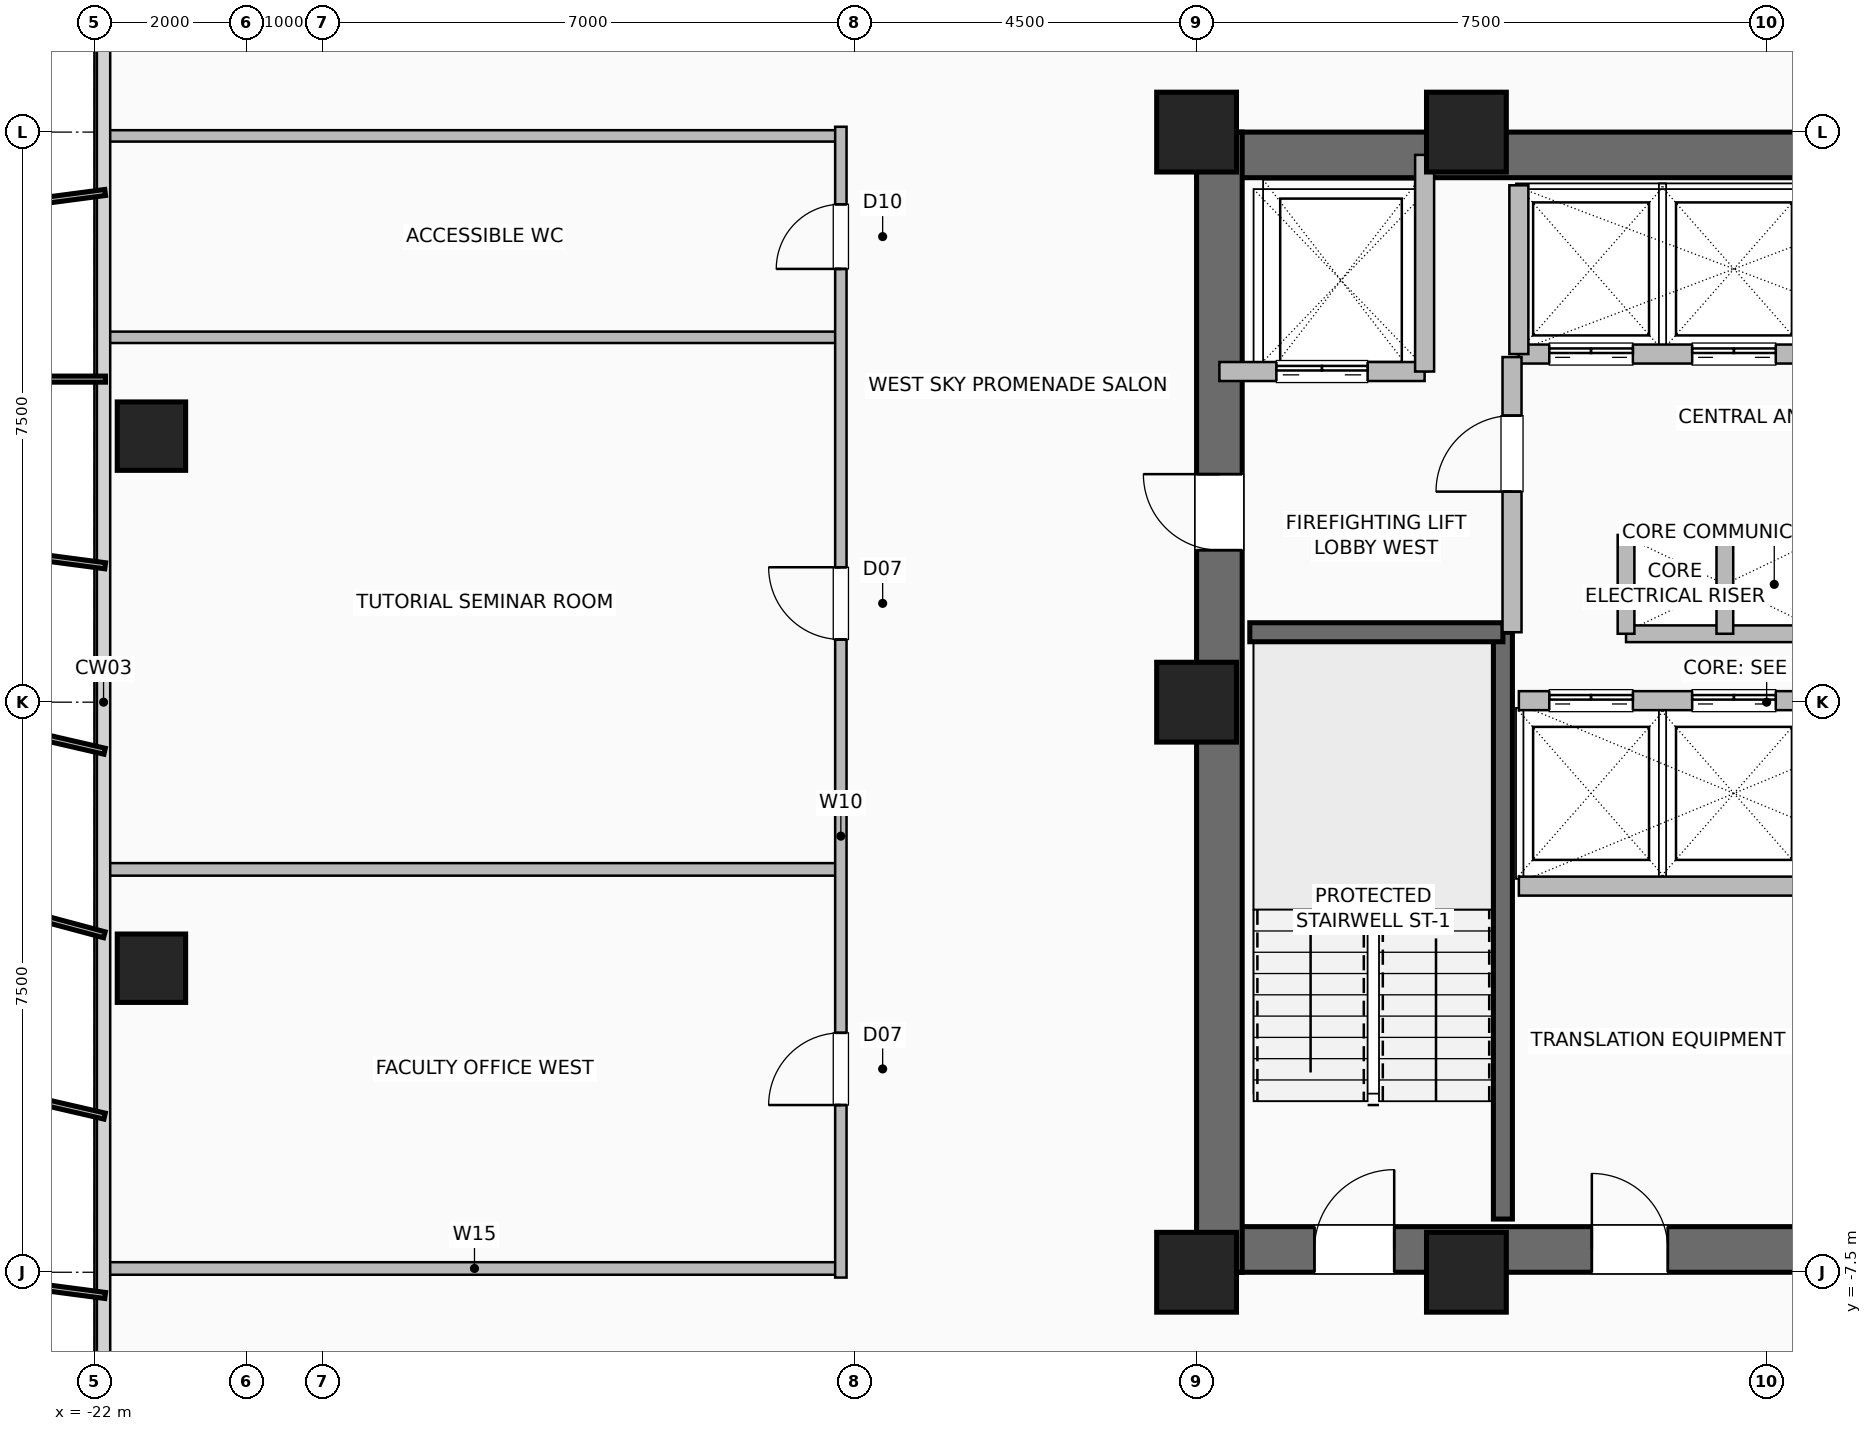
"""IFC4 building model, lengths in metres.
Left out: names, types, materials, properties, quantities, classifications, styles, units other than length and angle.
Written with IfcOpenShell. Run it as: python <this file> out.ifc"""

import sys

from ifc_helpers import new_model, si_unit, direction, frame, frame_2d, origin, origin_2d, place, context, subcontext, project, spatial, rectangle, hollow_rectangle, extrude, element, fill, save


model = new_model("IFC4")
c1 = context("Model", 3, precision=1e-05, world=origin(), true_north=direction((0.0, 1.0)))
c2 = subcontext(c1, "Body", "Model", "MODEL_VIEW")
j1 = project(units=[si_unit("LENGTHUNIT", "METRE"), si_unit("PLANEANGLEUNIT", "RADIAN")], contexts=[c1])
p1 = place(None, origin())
s1 = spatial("IfcSite", under=j1, at=p1, CompositionType="ELEMENT")
p2 = place(p1, origin())
s2 = spatial("IfcBuilding", under=s1, at=p2, CompositionType="ELEMENT")
p3 = place(p2, frame((0.0, 0.0, 137.2)))
s3 = spatial("IfcBuildingStorey", under=s2, at=p3, CompositionType="ELEMENT", Elevation=137.2)
for number, where, z_axis, x_axis in (
    (1, (-7.5, -7.5, 0.0), (0.0, 0.0, 1.0), (1.0, 0.0, 0.0)),
    (2, (-3.95, -7.5, 0.0), (0.0, 0.0, 1.0), (1.0, 0.0, 0.0)),
    (3, (-3.95, 7.5, 0.0), (0.0, 0.0, 1.0), (1.0, 0.0, 0.0)),
    (4, (-7.5, 7.5, 0.0), (0.0, 0.0, 1.0), (1.0, 0.0, 0.0)),
    (5, (-7.5, 0.0, 0.0), (0.0, 0.0, 1.0), (1.0, 0.0, 0.0)),
):
    element("IfcColumn", number, at=place(p3, frame(where, z_axis=z_axis, x_axis=x_axis)), inside=s3, PredefinedType="COLUMN", context=c2, shape_type="SweptSolid", body=[
        extrude(hollow_rectangle(XDim=1.05, YDim=1.05, WallThickness=0.05, at=origin_2d()), origin(), (0.0, 0.0, 1.0), 3.6),
    ])
for number, where, z_axis, x_axis in (
    (6, (-21.25, -3.5, 0.0), (0.0, 0.0, 1.0), (1.0, 0.0, 0.0)),
    (7, (-21.25, 3.5, 0.0), (0.0, 0.0, 1.0), (1.0, 0.0, 0.0)),
):
    element("IfcColumn", number, at=place(p3, frame(where, z_axis=z_axis, x_axis=x_axis)), inside=s3, PredefinedType="COLUMN", context=c2, shape_type="SweptSolid", body=[
        extrude(hollow_rectangle(XDim=0.9, YDim=0.9, WallThickness=0.045, at=origin_2d()), origin(), (0.0, 0.0, 1.0), 3.6),
    ])
p4 = place(p3, frame((-7.5, -7.2, 0.0), z_axis=(0.0, 0.0, 1.0), x_axis=(1.0, 0.0, 0.0)))
e8 = element("IfcWall", 8, at=p4, inside=s3, PredefinedType="SHEAR", context=c2, shape_type="SweptSolid", body=[
    extrude(rectangle(XDim=15.0, YDim=0.6, at=frame_2d((7.5, 0.0))), origin(), (0.0, 0.0, 1.0), 3.36),
])
p5 = place(p4, frame((1.55, 0.0, 0.0)))
e9 = element("IfcOpeningElement", 9, at=p5, cuts=e8, PredefinedType="OPENING", context=c2, shape_type="SweptSolid", body=[
    extrude(rectangle(XDim=1.05, YDim=2.08, at=frame_2d((0.525, 1.04))), frame((0.0, 0.31, 0.0), z_axis=(0.0, -1.0, 0.0), x_axis=(1.0, 0.0, 0.0)), (0.0, 0.0, 1.0), 0.62),
])
p6 = place(p4, frame((12.4, 0.0, 0.0)))
e10 = element("IfcOpeningElement", 10, at=p6, cuts=e8, PredefinedType="OPENING", context=c2, shape_type="SweptSolid", body=[
    extrude(rectangle(XDim=1.05, YDim=2.08, at=frame_2d((0.525, 1.04))), frame((0.0, 0.31, 0.0), z_axis=(0.0, -1.0, 0.0), x_axis=(1.0, 0.0, 0.0)), (0.0, 0.0, 1.0), 0.62),
])
p7 = place(p4, frame((5.2, 0.0, 0.0)))
e11 = element("IfcOpeningElement", 11, at=p7, cuts=e8, PredefinedType="OPENING", context=c2, shape_type="SweptSolid", body=[
    extrude(rectangle(XDim=1.0, YDim=2.08, at=frame_2d((0.5, 1.04))), frame((0.0, 0.31, 0.0), z_axis=(0.0, -1.0, 0.0), x_axis=(1.0, 0.0, 0.0)), (0.0, 0.0, 1.0), 0.62),
])
p8 = place(p4, frame((8.65, 0.0, 0.0)))
e12 = element("IfcOpeningElement", 12, at=p8, cuts=e8, PredefinedType="OPENING", context=c2, shape_type="SweptSolid", body=[
    extrude(rectangle(XDim=1.0, YDim=2.08, at=frame_2d((0.5, 1.04))), frame((0.0, 0.31, 0.0), z_axis=(0.0, -1.0, 0.0), x_axis=(1.0, 0.0, 0.0)), (0.0, 0.0, 1.0), 0.62),
])
p9 = place(p3, frame((-7.5, 7.2, 0.0), z_axis=(0.0, 0.0, 1.0), x_axis=(1.0, 0.0, 0.0)))
e13 = element("IfcWall", 13, at=p9, inside=s3, PredefinedType="SHEAR", context=c2, shape_type="SweptSolid", body=[
    extrude(rectangle(XDim=15.0, YDim=0.6, at=frame_2d((7.5, 0.0))), origin(), (0.0, 0.0, 1.0), 3.36),
])
p10 = place(p3, frame((-7.2, -7.5, 0.0), z_axis=(0.0, 0.0, 1.0), x_axis=(0.0, 1.0, 0.0)))
e14 = element("IfcWall", 14, at=p10, inside=s3, PredefinedType="SHEAR", context=c2, shape_type="SweptSolid", body=[
    extrude(rectangle(XDim=15.0, YDim=0.6, at=frame_2d((7.5, 0.0))), origin(), (0.0, 0.0, 1.0), 3.36),
])
p11 = place(p10, frame((9.5, 0.0, 0.0)))
e15 = element("IfcOpeningElement", 15, at=p11, cuts=e14, PredefinedType="OPENING", context=c2, shape_type="SweptSolid", body=[
    extrude(rectangle(XDim=1.0, YDim=2.08, at=frame_2d((0.5, 1.04))), frame((0.0, 0.31, 0.0), z_axis=(0.0, -1.0, 0.0), x_axis=(1.0, 0.0, 0.0)), (0.0, 0.0, 1.0), 0.62),
])
p12 = place(p3, frame((-3.47, -6.8, 0.0), z_axis=(0.0, 0.0, 1.0), x_axis=(0.0, 1.0, 0.0)))
e16 = element("IfcWall", 16, at=p12, inside=s3, PredefinedType="SHEAR", context=c2, shape_type="SweptSolid", body=[
    extrude(rectangle(XDim=7.72, YDim=0.25, at=frame_2d((3.86, 0.0))), origin(), (0.0, 0.0, 1.0), 3.36),
])
p13 = place(p3, frame((-6.8, 0.92, 0.0), z_axis=(0.0, 0.0, 1.0), x_axis=(1.0, 0.0, 0.0)))
e17 = element("IfcWall", 17, at=p13, inside=s3, PredefinedType="SHEAR", context=c2, shape_type="SweptSolid", body=[
    extrude(rectangle(XDim=3.33, YDim=0.25, at=frame_2d((1.665, 0.0))), origin(), (0.0, 0.0, 1.0), 3.36),
])
for number, where, z_axis, x_axis in (
    (18, (-1.85, 2.2, 0.0), (0.0, 0.0, 1.0), (1.0, 0.0, 0.0)),
    (19, (-1.85, 0.9, 0.0), (0.0, 0.0, 1.0), (1.0, 0.0, 0.0)),
):
    element("IfcWall", number, at=place(p3, frame(where, z_axis=z_axis, x_axis=x_axis)), inside=s3, PredefinedType="PARTITIONING", context=c2, shape_type="SweptSolid", body=[
        extrude(rectangle(XDim=2.6, YDim=0.22, at=frame_2d((1.3, 0.0))), origin(), (0.0, 0.0, 1.0), 3.36),
    ])
for number, where, z_axis, x_axis in (
    (20, (-0.55, 0.9, 0.0), (0.0, 0.0, 1.0), (0.0, 1.0, 0.0)),
    (21, (-1.85, 0.9, 0.0), (0.0, 0.0, 1.0), (0.0, 1.0, 0.0)),
):
    element("IfcWall", number, at=place(p3, frame(where, z_axis=z_axis, x_axis=x_axis)), inside=s3, PredefinedType="PARTITIONING", context=c2, shape_type="SweptSolid", body=[
        extrude(rectangle(XDim=1.3, YDim=0.22, at=frame_2d((0.65, 0.0))), origin(), (0.0, 0.0, 1.0), 3.36),
    ])
p14 = place(p3, frame((-3.26, 0.02, 0.0), z_axis=(0.0, 0.0, 1.0), x_axis=(1.0, 0.0, 0.0)))
e22 = element("IfcWall", 22, at=p14, inside=s3, PredefinedType="SHEAR", context=c2, shape_type="SweptSolid", body=[
    extrude(rectangle(XDim=5.64, YDim=0.25, at=frame_2d((2.82, 0.0))), origin(), (0.0, 0.0, 1.0), 3.36),
])
p15 = place(p14, frame((0.4, 0.0, 0.0)))
e23 = element("IfcOpeningElement", 23, at=p15, cuts=e22, PredefinedType="OPENING", context=c2, shape_type="SweptSolid", body=[
    extrude(rectangle(XDim=1.1, YDim=2.2, at=frame_2d((0.55, 1.1))), frame((0.0, 0.135, 0.0), z_axis=(0.0, -1.0, 0.0), x_axis=(1.0, 0.0, 0.0)), (0.0, 0.0, 1.0), 0.27),
])
p16 = place(p14, frame((2.28, 0.0, 0.0)))
e24 = element("IfcOpeningElement", 24, at=p16, cuts=e22, PredefinedType="OPENING", context=c2, shape_type="SweptSolid", body=[
    extrude(rectangle(XDim=1.1, YDim=2.2, at=frame_2d((0.55, 1.1))), frame((0.0, 0.135, 0.0), z_axis=(0.0, -1.0, 0.0), x_axis=(1.0, 0.0, 0.0)), (0.0, 0.0, 1.0), 0.27),
])
p17 = place(p14, frame((4.16, 0.0, 0.0)))
e25 = element("IfcOpeningElement", 25, at=p17, cuts=e22, PredefinedType="OPENING", context=c2, shape_type="SweptSolid", body=[
    extrude(rectangle(XDim=1.1, YDim=2.2, at=frame_2d((0.55, 1.1))), frame((0.0, 0.135, 0.0), z_axis=(0.0, -1.0, 0.0), x_axis=(1.0, 0.0, 0.0)), (0.0, 0.0, 1.0), 0.27),
])
p18 = place(p3, frame((-3.26, -2.42, 0.0), z_axis=(0.0, 0.0, 1.0), x_axis=(1.0, 0.0, 0.0)))
e26 = element("IfcWall", 26, at=p18, inside=s3, PredefinedType="SHEAR", context=c2, shape_type="SweptSolid", body=[
    extrude(rectangle(XDim=5.64, YDim=0.25, at=frame_2d((2.82, 0.0))), origin(), (0.0, 0.0, 1.0), 3.36),
])
p19 = place(p3, frame((-3.26, 4.58, 0.0), z_axis=(0.0, 0.0, 1.0), x_axis=(1.0, 0.0, 0.0)))
e27 = element("IfcWall", 27, at=p19, inside=s3, PredefinedType="SHEAR", context=c2, shape_type="SweptSolid", body=[
    extrude(rectangle(XDim=5.64, YDim=0.25, at=frame_2d((2.82, 0.0))), origin(), (0.0, 0.0, 1.0), 3.36),
])
p20 = place(p19, frame((0.4, 0.0, 0.0)))
e28 = element("IfcOpeningElement", 28, at=p20, cuts=e27, PredefinedType="OPENING", context=c2, shape_type="SweptSolid", body=[
    extrude(rectangle(XDim=1.1, YDim=2.2, at=frame_2d((0.55, 1.1))), frame((0.0, 0.135, 0.0), z_axis=(0.0, -1.0, 0.0), x_axis=(1.0, 0.0, 0.0)), (0.0, 0.0, 1.0), 0.27),
])
p21 = place(p19, frame((2.28, 0.0, 0.0)))
e29 = element("IfcOpeningElement", 29, at=p21, cuts=e27, PredefinedType="OPENING", context=c2, shape_type="SweptSolid", body=[
    extrude(rectangle(XDim=1.1, YDim=2.2, at=frame_2d((0.55, 1.1))), frame((0.0, 0.135, 0.0), z_axis=(0.0, -1.0, 0.0), x_axis=(1.0, 0.0, 0.0)), (0.0, 0.0, 1.0), 0.27),
])
p22 = place(p19, frame((4.16, 0.0, 0.0)))
e30 = element("IfcOpeningElement", 30, at=p22, cuts=e27, PredefinedType="OPENING", context=c2, shape_type="SweptSolid", body=[
    extrude(rectangle(XDim=1.1, YDim=2.2, at=frame_2d((0.55, 1.1))), frame((0.0, 0.135, 0.0), z_axis=(0.0, -1.0, 0.0), x_axis=(1.0, 0.0, 0.0)), (0.0, 0.0, 1.0), 0.27),
])
p23 = place(p3, frame((-3.26, 4.58, 0.0), z_axis=(0.0, 0.0, 1.0), x_axis=(0.0, 1.0, 0.0)))
e31 = element("IfcWall", 31, at=p23, inside=s3, PredefinedType="SHEAR", context=c2, shape_type="SweptSolid", body=[
    extrude(rectangle(XDim=2.22, YDim=0.25, at=frame_2d((1.11, 0.0))), origin(), (0.0, 0.0, 1.0), 3.36),
])
p24 = place(p3, frame((-7.2, 4.35, 0.0), z_axis=(0.0, 0.0, 1.0), x_axis=(1.0, 0.0, 0.0)))
e32 = element("IfcWall", 32, at=p24, inside=s3, PredefinedType="SHEAR", context=c2, shape_type="SweptSolid", body=[
    extrude(rectangle(XDim=2.7, YDim=0.25, at=frame_2d((1.35, 0.0))), origin(), (0.0, 0.0, 1.0), 3.36),
])
p25 = place(p24, frame((0.75, 0.0, 0.0)))
e33 = element("IfcOpeningElement", 33, at=p25, cuts=e32, PredefinedType="OPENING", context=c2, shape_type="SweptSolid", body=[
    extrude(rectangle(XDim=1.2, YDim=2.2, at=frame_2d((0.6, 1.1))), frame((0.0, 0.135, 0.0), z_axis=(0.0, -1.0, 0.0), x_axis=(1.0, 0.0, 0.0)), (0.0, 0.0, 1.0), 0.27),
])
p26 = place(p3, frame((-4.5, 4.35, 0.0), z_axis=(0.0, 0.0, 1.0), x_axis=(0.0, 1.0, 0.0)))
e34 = element("IfcWall", 34, at=p26, inside=s3, PredefinedType="SHEAR", context=c2, shape_type="SweptSolid", body=[
    extrude(rectangle(XDim=2.85, YDim=0.25, at=frame_2d((1.425, 0.0))), origin(), (0.0, 0.0, 1.0), 3.36),
])
p27 = place(p3, frame((-3.35, 0.92, 0.0), z_axis=(0.0, 0.0, 1.0), x_axis=(0.0, 1.0, 0.0)))
e35 = element("IfcWall", 35, at=p27, inside=s3, PredefinedType="SHEAR", context=c2, shape_type="SweptSolid", body=[
    extrude(rectangle(XDim=3.62, YDim=0.25, at=frame_2d((1.81, 0.0))), origin(), (0.0, 0.0, 1.0), 3.36),
])
p28 = place(p27, frame((1.85, 0.0, 0.0)))
e36 = element("IfcOpeningElement", 36, at=p28, cuts=e35, PredefinedType="OPENING", context=c2, shape_type="SweptSolid", body=[
    extrude(rectangle(XDim=1.0, YDim=2.08, at=frame_2d((0.5, 1.04))), frame((0.0, 0.135, 0.0), z_axis=(0.0, -1.0, 0.0), x_axis=(1.0, 0.0, 0.0)), (0.0, 0.0, 1.0), 0.27),
])
for number, where, z_axis, x_axis in (
    (37, (-21.82, -7.45, 0.0), (0.0, 0.0, 1.0), (1.0, 0.0, 0.0)),
    (38, (-21.82, -2.2, 0.0), (0.0, 0.0, 1.0), (1.0, 0.0, 0.0)),
):
    element("IfcWall", number, at=place(p3, frame(where, z_axis=z_axis, x_axis=x_axis)), inside=s3, PredefinedType="PLUMBINGWALL", context=c2, shape_type="SweptSolid", body=[
        extrude(rectangle(XDim=9.64, YDim=0.165, at=frame_2d((4.82, 0.0))), origin(), (0.0, 0.0, 1.0), 3.36),
    ])
p29 = place(p3, frame((-21.82, 4.8, 0.0), z_axis=(0.0, 0.0, 1.0), x_axis=(1.0, 0.0, 0.0)))
e39 = element("IfcWall", 39, at=p29, inside=s3, PredefinedType="PARTITIONING", context=c2, shape_type="SweptSolid", body=[
    extrude(rectangle(XDim=9.64, YDim=0.15, at=frame_2d((4.82, 0.0))), origin(), (0.0, 0.0, 1.0), 2.928),
])
p30 = place(p3, frame((-21.82, 7.45, 0.0), z_axis=(0.0, 0.0, 1.0), x_axis=(1.0, 0.0, 0.0)))
e40 = element("IfcWall", 40, at=p30, inside=s3, PredefinedType="PARTITIONING", context=c2, shape_type="SweptSolid", body=[
    extrude(rectangle(XDim=9.64, YDim=0.15, at=frame_2d((4.82, 0.0))), origin(), (0.0, 0.0, 1.0), 3.36),
])
p31 = place(p3, frame((-12.18, -7.57, 0.0), z_axis=(0.0, 0.0, 1.0), x_axis=(0.0, 1.0, 0.0)))
e41 = element("IfcWall", 41, at=p31, inside=s3, PredefinedType="PARTITIONING", context=c2, shape_type="SweptSolid", body=[
    extrude(rectangle(XDim=15.14, YDim=0.15, at=frame_2d((7.57, 0.0))), origin(), (0.0, 0.0, 1.0), 3.36),
])
p32 = place(p31, frame((2.27, 0.0, 0.0)))
e42 = element("IfcOpeningElement", 42, at=p32, cuts=e41, PredefinedType="OPENING", context=c2, shape_type="SweptSolid", body=[
    extrude(rectangle(XDim=0.95, YDim=2.06, at=frame_2d((0.475, 1.03))), frame((0.0, 0.085, 0.0), z_axis=(0.0, -1.0, 0.0), x_axis=(1.0, 0.0, 0.0)), (0.0, 0.0, 1.0), 0.17),
])
p33 = place(p31, frame((8.395, 0.0, 0.0)))
e43 = element("IfcOpeningElement", 43, at=p33, cuts=e41, PredefinedType="OPENING", context=c2, shape_type="SweptSolid", body=[
    extrude(rectangle(XDim=0.95, YDim=2.06, at=frame_2d((0.475, 1.03))), frame((0.0, 0.085, 0.0), z_axis=(0.0, -1.0, 0.0), x_axis=(1.0, 0.0, 0.0)), (0.0, 0.0, 1.0), 0.17),
])
p34 = place(p31, frame((13.27, 0.0, 0.0)))
e44 = element("IfcOpeningElement", 44, at=p34, cuts=e41, PredefinedType="OPENING", context=c2, shape_type="SweptSolid", body=[
    extrude(rectangle(XDim=0.85, YDim=2.05, at=frame_2d((0.425, 1.025))), frame((0.0, 0.085, 0.0), z_axis=(0.0, -1.0, 0.0), x_axis=(1.0, 0.0, 0.0)), (0.0, 0.0, 1.0), 0.17),
])
p35 = place(p5, origin())
e45 = element("IfcDoor", 45, at=p35, inside=s3, OperationType="SINGLE_SWING_RIGHT", PredefinedType="DOOR", context=c2, shape_type="SweptSolid", body=[
    extrude(rectangle(XDim=1.05, YDim=2.08, at=frame_2d((0.525, 1.04))), frame((0.0, 0.025, 0.0), z_axis=(0.0, -1.0, 0.0), x_axis=(1.0, 0.0, 0.0)), (0.0, 0.0, 1.0), 0.05),
])
fill(e9, e45)
p36 = place(p11, origin())
e46 = element("IfcDoor", 46, at=p36, inside=s3, OperationType="SINGLE_SWING_RIGHT", PredefinedType="DOOR", context=c2, shape_type="SweptSolid", body=[
    extrude(rectangle(XDim=1.0, YDim=2.08, at=frame_2d((0.5, 1.04))), frame((0.0, 0.025, 0.0), z_axis=(0.0, -1.0, 0.0), x_axis=(1.0, 0.0, 0.0)), (0.0, 0.0, 1.0), 0.05),
])
fill(e15, e46)
p37 = place(p7, origin())
e47 = element("IfcDoor", 47, at=p37, inside=s3, OperationType="SINGLE_SWING_LEFT", PredefinedType="DOOR", context=c2, shape_type="SweptSolid", body=[
    extrude(rectangle(XDim=1.0, YDim=2.08, at=frame_2d((0.5, 1.04))), frame((0.0, 0.025, 0.0), z_axis=(0.0, -1.0, 0.0), x_axis=(1.0, 0.0, 0.0)), (0.0, 0.0, 1.0), 0.05),
])
fill(e11, e47)
p38 = place(p15, origin())
e48 = element("IfcDoor", 48, at=p38, inside=s3, OperationType="DOUBLE_DOOR_SLIDING", PredefinedType="DOOR", context=c2, shape_type="SweptSolid", body=[
    extrude(rectangle(XDim=1.1, YDim=2.2, at=frame_2d((0.55, 1.1))), frame((0.0, 0.025, 0.0), z_axis=(0.0, -1.0, 0.0), x_axis=(1.0, 0.0, 0.0)), (0.0, 0.0, 1.0), 0.05),
])
fill(e23, e48)
p39 = place(p16, origin())
e49 = element("IfcDoor", 49, at=p39, inside=s3, OperationType="DOUBLE_DOOR_SLIDING", PredefinedType="DOOR", context=c2, shape_type="SweptSolid", body=[
    extrude(rectangle(XDim=1.1, YDim=2.2, at=frame_2d((0.55, 1.1))), frame((0.0, 0.025, 0.0), z_axis=(0.0, -1.0, 0.0), x_axis=(1.0, 0.0, 0.0)), (0.0, 0.0, 1.0), 0.05),
])
fill(e24, e49)
p40 = place(p20, origin())
e50 = element("IfcDoor", 50, at=p40, inside=s3, OperationType="DOUBLE_DOOR_SLIDING", PredefinedType="DOOR", context=c2, shape_type="SweptSolid", body=[
    extrude(rectangle(XDim=1.1, YDim=2.2, at=frame_2d((0.55, 1.1))), frame((0.0, 0.025, 0.0), z_axis=(0.0, -1.0, 0.0), x_axis=(1.0, 0.0, 0.0)), (0.0, 0.0, 1.0), 0.05),
])
fill(e28, e50)
p41 = place(p21, origin())
e51 = element("IfcDoor", 51, at=p41, inside=s3, OperationType="DOUBLE_DOOR_SLIDING", PredefinedType="DOOR", context=c2, shape_type="SweptSolid", body=[
    extrude(rectangle(XDim=1.1, YDim=2.2, at=frame_2d((0.55, 1.1))), frame((0.0, 0.025, 0.0), z_axis=(0.0, -1.0, 0.0), x_axis=(1.0, 0.0, 0.0)), (0.0, 0.0, 1.0), 0.05),
])
fill(e29, e51)
p42 = place(p25, origin())
e52 = element("IfcDoor", 52, at=p42, inside=s3, OperationType="DOUBLE_DOOR_SLIDING", PredefinedType="DOOR", context=c2, shape_type="SweptSolid", body=[
    extrude(rectangle(XDim=1.2, YDim=2.2, at=frame_2d((0.6, 1.1))), frame((0.0, 0.025, 0.0), z_axis=(0.0, -1.0, 0.0), x_axis=(1.0, 0.0, 0.0)), (0.0, 0.0, 1.0), 0.05),
])
fill(e33, e52)
p43 = place(p28, origin())
e53 = element("IfcDoor", 53, at=p43, inside=s3, OperationType="SINGLE_SWING_LEFT", PredefinedType="DOOR", context=c2, shape_type="SweptSolid", body=[
    extrude(rectangle(XDim=1.0, YDim=2.08, at=frame_2d((0.5, 1.04))), frame((0.0, 0.025, 0.0), z_axis=(0.0, -1.0, 0.0), x_axis=(1.0, 0.0, 0.0)), (0.0, 0.0, 1.0), 0.05),
])
fill(e36, e53)
p44 = place(p32, origin())
e54 = element("IfcDoor", 54, at=p44, inside=s3, OperationType="SINGLE_SWING_LEFT", PredefinedType="DOOR", context=c2, shape_type="SweptSolid", body=[
    extrude(rectangle(XDim=0.95, YDim=2.06, at=frame_2d((0.475, 1.03))), frame((0.0, 0.025, 0.0), z_axis=(0.0, -1.0, 0.0), x_axis=(1.0, 0.0, 0.0)), (0.0, 0.0, 1.0), 0.05),
])
fill(e42, e54)
p45 = place(p33, origin())
e55 = element("IfcDoor", 55, at=p45, inside=s3, OperationType="SINGLE_SWING_RIGHT", PredefinedType="DOOR", context=c2, shape_type="SweptSolid", body=[
    extrude(rectangle(XDim=0.95, YDim=2.06, at=frame_2d((0.475, 1.03))), frame((0.0, 0.025, 0.0), z_axis=(0.0, -1.0, 0.0), x_axis=(1.0, 0.0, 0.0)), (0.0, 0.0, 1.0), 0.05),
])
fill(e43, e55)
p46 = place(p34, origin())
e56 = element("IfcDoor", 56, at=p46, inside=s3, OperationType="SINGLE_SWING_LEFT", PredefinedType="DOOR", context=c2, shape_type="SweptSolid", body=[
    extrude(rectangle(XDim=0.85, YDim=2.05, at=frame_2d((0.425, 1.025))), frame((0.0, 0.025, 0.0), z_axis=(0.0, -1.0, 0.0), x_axis=(1.0, 0.0, 0.0)), (0.0, 0.0, 1.0), 0.05),
])
fill(e44, e56)
save(model, sys.argv[1])
